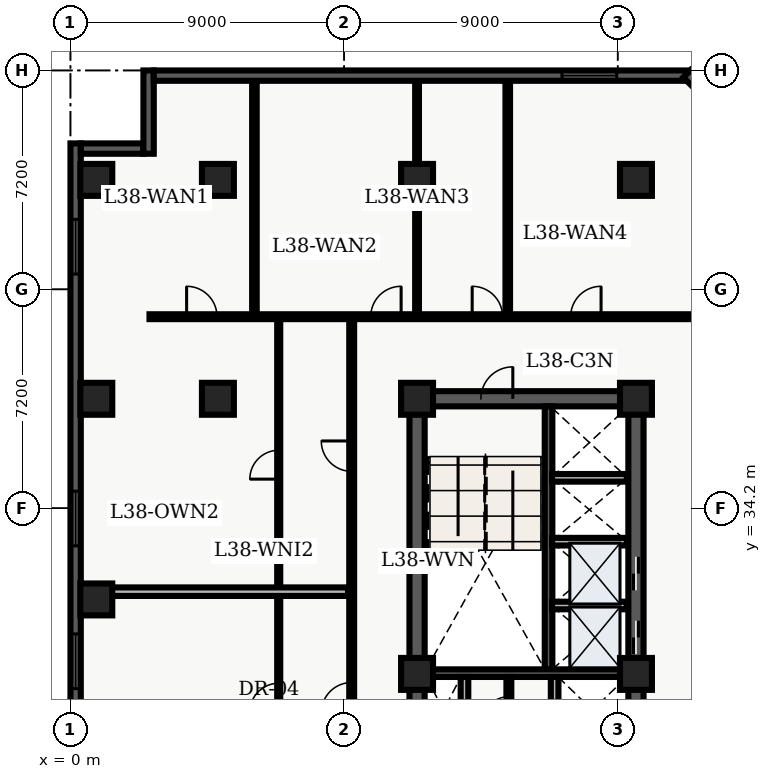
"""IFC4 building model, lengths in metres.
Left out: names, types, materials, properties, quantities, classifications, styles, units other than length and angle.
Written with IfcOpenShell. Run it as: python <this file> out.ifc"""

import sys

from ifc_helpers import new_model, entity, si_unit, converted_unit, direction, frame, origin_with_axes, origin_2d_with_axis, place, context, subcontext, project, spatial, polyline, rectangle, outline, extrude, element, fill, save


model = new_model("IFC4")
c1 = context("Model", 3, precision=1e-05, world=origin_with_axes(), true_north=direction((0.0, 1.0)))
c2 = subcontext(c1, "Body", "Model", "MODEL_VIEW")
j1 = project(units=[si_unit("LENGTHUNIT", "METRE"), converted_unit("PLANEANGLEUNIT", "DEGREE", entity("IfcPlaneAngleMeasure", 0.017), si_unit("PLANEANGLEUNIT", "RADIAN"), dimensions=[0, 0, 0, 0, 0, 0, 0])], contexts=[c1])
p1 = place(None, origin_with_axes())
s1 = spatial("IfcSite", under=j1, at=p1, CompositionType="ELEMENT")
p2 = place(p1, origin_with_axes())
s2 = spatial("IfcBuilding", under=s1, at=p2, CompositionType="ELEMENT")
p3 = place(p2, frame((0.0, 0.0, 156.3), z_axis=(0.0, 0.0, 1.0), x_axis=(1.0, 0.0, 0.0)))
s3 = spatial("IfcBuildingStorey", under=s2, at=p3, CompositionType="ELEMENT", Elevation=156.3)
p4 = place(p3, frame((11.4, 10.8, 0.0), z_axis=(0.0, 0.0, 1.0), x_axis=(0.0, 1.0, 0.0)))
e1 = element("IfcWall", 1, at=p4, inside=s3, PredefinedType="SHEAR", context=c2, shape_type="SweptSolid", body=[
    extrude(outline(polyline([(0.0, -0.25), (27.0, -0.25), (27.0, 0.25), (0.0, 0.25), (0.0, -0.25)])), origin_with_axes(), (0.0, 0.0, 1.0), 3.66),
])
p5 = place(p3, frame((11.4, 37.8, 0.0), z_axis=(0.0, 0.0, 1.0), x_axis=(1.0, 0.0, 0.0)))
e2 = element("IfcWall", 2, at=p5, inside=s3, PredefinedType="SHEAR", context=c2, shape_type="SweptSolid", body=[
    extrude(outline(polyline([(0.0, -0.25), (7.2, -0.25), (7.2, 0.25), (0.0, 0.25), (0.0, -0.25)])), origin_with_axes(), (0.0, 0.0, 1.0), 3.66),
])
p6 = place(p5, frame((2.625, 0.0, 0.0), z_axis=(0.0, 0.0, 1.0), x_axis=(1.0, 0.0, 0.0)))
e3 = element("IfcOpeningElement", 3, at=p6, cuts=e2, PredefinedType="OPENING", context=c2, shape_type="SweptSolid", body=[
    extrude(rectangle(XDim=1.05, YDim=0.52, at=origin_2d_with_axis()), origin_with_axes(), (0.0, 0.0, 1.0), 2.15),
])
p7 = place(p3, frame((18.6, 24.3, 0.0), z_axis=(0.0, 0.0, 1.0), x_axis=(0.0, 1.0, 0.0)))
e4 = element("IfcWall", 4, at=p7, inside=s3, PredefinedType="SHEAR", context=c2, shape_type="SweptSolid", body=[
    extrude(outline(polyline([(0.0, -0.25), (13.5, -0.25), (13.5, 0.25), (0.0, 0.25), (0.0, -0.25)])), origin_with_axes(), (0.0, 0.0, 1.0), 3.66),
])
p8 = place(p7, frame((5.65, 0.0, 0.0), z_axis=(0.0, 0.0, 1.0), x_axis=(1.0, 0.0, 0.0)))
e5 = element("IfcOpeningElement", 5, at=p8, cuts=e4, PredefinedType="OPENING", context=c2, shape_type="SweptSolid", body=[
    extrude(rectangle(XDim=1.1, YDim=0.52, at=origin_2d_with_axis()), origin_with_axes(), (0.0, 0.0, 1.0), 2.15),
])
p9 = place(p7, frame((7.75, 0.0, 0.0), z_axis=(0.0, 0.0, 1.0), x_axis=(1.0, 0.0, 0.0)))
e6 = element("IfcOpeningElement", 6, at=p9, cuts=e4, PredefinedType="OPENING", context=c2, shape_type="SweptSolid", body=[
    extrude(rectangle(XDim=1.1, YDim=0.52, at=origin_2d_with_axis()), origin_with_axes(), (0.0, 0.0, 1.0), 2.15),
])
p10 = place(p3, frame((15.725, 28.9, 0.0), z_axis=(0.0, 0.0, 1.0), x_axis=(0.0, 1.0, 0.0)))
e7 = element("IfcWall", 7, at=p10, inside=s3, PredefinedType="SHEAR", context=c2, shape_type="SweptSolid", body=[
    extrude(outline(polyline([(0.0, -0.125), (8.65, -0.125), (8.65, 0.125), (0.0, 0.125), (0.0, -0.125)])), origin_with_axes(), (0.0, 0.0, 1.0), 3.66),
])
p11 = place(p3, frame((11.65, 28.775, 0.0), z_axis=(0.0, 0.0, 1.0), x_axis=(1.0, 0.0, 0.0)))
e8 = element("IfcWall", 8, at=p11, inside=s3, PredefinedType="SHEAR", context=c2, shape_type="SweptSolid", body=[
    extrude(outline(polyline([(0.0, -0.125), (6.7, -0.125), (6.7, 0.125), (0.0, 0.125), (0.0, -0.125)])), origin_with_axes(), (0.0, 0.0, 1.0), 3.66),
])
for number, where, z_axis, x_axis in (
    (9, (12.96, 26.45, 0.0), (0.0, 0.0, 1.0), (0.0, 1.0, 0.0)),
    (10, (15.925, 26.45, 0.0), (0.0, 0.0, 1.0), (0.0, 1.0, 0.0)),
):
    element("IfcWall", number, at=place(p3, frame(where, z_axis=z_axis, x_axis=x_axis)), inside=s3, PredefinedType="SOLIDWALL", context=c2, shape_type="SweptSolid", body=[
        extrude(outline(polyline([(0.0, -0.125), (2.2, -0.125), (2.2, 0.125), (0.0, 0.125), (0.0, -0.125)])), origin_with_axes(), (0.0, 0.0, 1.0), 2.7),
    ])
for number, where, z_axis, x_axis in (
    (11, (11.4, 28.75, 0.0), (0.0, 0.0, 1.0), (1.0, 0.0, 0.0)),
    (12, (11.4, 37.8, 0.0), (0.0, 0.0, 1.0), (1.0, 0.0, 0.0)),
    (13, (11.4, 45.0, 0.0), (0.0, 0.0, 1.0), (1.0, 0.0, 0.0)),
    (14, (18.6, 28.75, 0.0), (0.0, 0.0, 1.0), (1.0, 0.0, 0.0)),
    (15, (18.6, 37.8, 0.0), (0.0, 0.0, 1.0), (1.0, 0.0, 0.0)),
    (16, (18.6, 45.0, 0.0), (0.0, 0.0, 1.0), (1.0, 0.0, 0.0)),
    (17, (4.85, 37.8, 0.0), (0.0, 0.0, 1.0), (1.0, 0.0, 0.0)),
    (18, (4.85, 45.0, 0.0), (0.0, 0.0, 1.0), (1.0, 0.0, 0.0)),
    (19, (0.85, 31.2, 0.0), (0.0, 0.0, 1.0), (1.0, 0.0, 0.0)),
    (20, (0.85, 37.8, 0.0), (0.0, 0.0, 1.0), (1.0, 0.0, 0.0)),
    (21, (0.85, 45.0, 0.0), (0.0, 0.0, 1.0), (1.0, 0.0, 0.0)),
):
    element("IfcColumn", number, at=place(p3, frame(where, z_axis=z_axis, x_axis=x_axis)), inside=s3, PredefinedType="COLUMN", context=c2, shape_type="SweptSolid", body=[
        extrude(rectangle(XDim=1.05, YDim=1.05, at=origin_2d_with_axis()), origin_with_axes(), (0.0, 0.0, 1.0), 3.9),
    ])
p12 = place(p3, frame((14.42, 26.45, 0.0), z_axis=(0.0, 0.0, 1.0), x_axis=(0.0, 1.0, 0.0)))
e22 = element("IfcWall", 22, at=p12, inside=s3, PredefinedType="PARTITIONING", context=c2, shape_type="SweptSolid", body=[
    extrude(outline(polyline([(0.0, -0.08), (2.2, -0.08), (2.2, 0.08), (0.0, 0.08), (0.0, -0.08)])), origin_with_axes(), (0.0, 0.0, 1.0), 2.7),
])
p13 = place(p12, frame((1.1, 0.0, 0.0), z_axis=(0.0, 0.0, 1.0), x_axis=(1.0, 0.0, 0.0)))
e23 = element("IfcOpeningElement", 23, at=p13, cuts=e22, PredefinedType="OPENING", context=c2, shape_type="SweptSolid", body=[
    extrude(rectangle(XDim=0.9, YDim=0.18, at=origin_2d_with_axis()), origin_with_axes(), (0.0, 0.0, 1.0), 2.15),
])
for number, where, z_axis, x_axis in (
    (24, (15.84, 31.0, 0.0), (0.0, 0.0, 1.0), (1.0, 0.0, 0.0)),
    (25, (15.84, 33.1, 0.0), (0.0, 0.0, 1.0), (1.0, 0.0, 0.0)),
    (26, (15.84, 35.2, 0.0), (0.0, 0.0, 1.0), (1.0, 0.0, 0.0)),
):
    element("IfcWall", number, at=place(p3, frame(where, z_axis=z_axis, x_axis=x_axis)), inside=s3, PredefinedType="SOLIDWALL", context=c2, shape_type="SweptSolid", body=[
        extrude(outline(polyline([(0.0, -0.125), (2.46, -0.125), (2.46, 0.125), (0.0, 0.125), (0.0, -0.125)])), origin_with_axes(), (0.0, 0.0, 1.0), 2.7),
    ])
p14 = place(p3, frame((2.6, 40.5, 0.0), z_axis=(0.0, 0.0, 1.0), x_axis=(1.0, 0.0, 0.0)))
e27 = element("IfcWall", 27, at=p14, inside=s3, PredefinedType="PARTITIONING", context=c2, shape_type="SweptSolid", body=[
    extrude(outline(polyline([(0.0, -0.08), (20.117, -0.08), (20.117, 0.08), (0.0, 0.08), (0.0, -0.08)])), origin_with_axes(), (0.0, 0.0, 1.0), 2.7),
])
p15 = place(p14, frame((1.72, 0.0, 0.0), z_axis=(0.0, 0.0, 1.0), x_axis=(1.0, 0.0, 0.0)))
e28 = element("IfcOpeningElement", 28, at=p15, cuts=e27, PredefinedType="OPENING", context=c2, shape_type="SweptSolid", body=[
    extrude(rectangle(XDim=1.0, YDim=0.18, at=origin_2d_with_axis()), origin_with_axes(), (0.0, 0.0, 1.0), 2.15),
])
p16 = place(p14, frame((7.776, 0.0, 0.0), z_axis=(0.0, 0.0, 1.0), x_axis=(1.0, 0.0, 0.0)))
e29 = element("IfcOpeningElement", 29, at=p16, cuts=e27, PredefinedType="OPENING", context=c2, shape_type="SweptSolid", body=[
    extrude(rectangle(XDim=1.0, YDim=0.18, at=origin_2d_with_axis()), origin_with_axes(), (0.0, 0.0, 1.0), 2.15),
])
p17 = place(p14, frame((11.113, 0.0, 0.0), z_axis=(0.0, 0.0, 1.0), x_axis=(1.0, 0.0, 0.0)))
e30 = element("IfcOpeningElement", 30, at=p17, cuts=e27, PredefinedType="OPENING", context=c2, shape_type="SweptSolid", body=[
    extrude(rectangle(XDim=1.0, YDim=0.18, at=origin_2d_with_axis()), origin_with_axes(), (0.0, 0.0, 1.0), 2.15),
])
p18 = place(p14, frame((14.352, 0.0, 0.0), z_axis=(0.0, 0.0, 1.0), x_axis=(1.0, 0.0, 0.0)))
e31 = element("IfcOpeningElement", 31, at=p18, cuts=e27, PredefinedType="OPENING", context=c2, shape_type="SweptSolid", body=[
    extrude(rectangle(XDim=1.0, YDim=0.18, at=origin_2d_with_axis()), origin_with_axes(), (0.0, 0.0, 1.0), 2.15),
])
p19 = place(p3, frame((9.25, 24.4, 0.0), z_axis=(0.0, 0.0, 1.0), x_axis=(0.0, 1.0, 0.0)))
e32 = element("IfcWall", 32, at=p19, inside=s3, PredefinedType="PARTITIONING", context=c2, shape_type="SweptSolid", body=[
    extrude(outline(polyline([(0.0, -0.08), (16.1, -0.08), (16.1, 0.08), (0.0, 0.08), (0.0, -0.08)])), origin_with_axes(), (0.0, 0.0, 1.0), 2.7),
])
p20 = place(p19, frame((3.567, 0.0, 0.0), z_axis=(0.0, 0.0, 1.0), x_axis=(1.0, 0.0, 0.0)))
e33 = element("IfcOpeningElement", 33, at=p20, cuts=e32, PredefinedType="OPENING", context=c2, shape_type="SweptSolid", body=[
    extrude(rectangle(XDim=1.0, YDim=0.18, at=origin_2d_with_axis()), origin_with_axes(), (0.0, 0.0, 1.0), 2.15),
])
p21 = place(p19, frame((11.512, 0.0, 0.0), z_axis=(0.0, 0.0, 1.0), x_axis=(1.0, 0.0, 0.0)))
e34 = element("IfcOpeningElement", 34, at=p21, cuts=e32, PredefinedType="OPENING", context=c2, shape_type="SweptSolid", body=[
    extrude(rectangle(XDim=1.0, YDim=0.18, at=origin_2d_with_axis()), origin_with_axes(), (0.0, 0.0, 1.0), 2.15),
])
p22 = place(p3, frame((6.85, 24.55, 0.0), z_axis=(0.0, 0.0, 1.0), x_axis=(0.0, 1.0, 0.0)))
e35 = element("IfcWall", 35, at=p22, inside=s3, PredefinedType="PARTITIONING", context=c2, shape_type="SweptSolid", body=[
    extrude(outline(polyline([(0.0, -0.05), (15.75, -0.05), (15.75, 0.05), (0.0, 0.05), (0.0, -0.05)])), origin_with_axes(), (0.0, 0.0, 1.0), 2.7),
])
p23 = place(p22, frame((3.417, 0.0, 0.0), z_axis=(0.0, 0.0, 1.0), x_axis=(1.0, 0.0, 0.0)))
e36 = element("IfcOpeningElement", 36, at=p23, cuts=e35, PredefinedType="OPENING", context=c2, shape_type="SweptSolid", body=[
    extrude(rectangle(XDim=0.95, YDim=0.12, at=origin_2d_with_axis()), origin_with_axes(), (0.0, 0.0, 1.0), 2.15),
])
p24 = place(p22, frame((11.082, 0.0, 0.0), z_axis=(0.0, 0.0, 1.0), x_axis=(1.0, 0.0, 0.0)))
e37 = element("IfcOpeningElement", 37, at=p24, cuts=e35, PredefinedType="OPENING", context=c2, shape_type="SweptSolid", body=[
    extrude(rectangle(XDim=0.95, YDim=0.12, at=origin_2d_with_axis()), origin_with_axes(), (0.0, 0.0, 1.0), 2.15),
])
p25 = place(p3, frame((0.335, 31.455, 0.0), z_axis=(0.0, 0.0, 1.0), x_axis=(1.0, 0.0, 0.0)))
e38 = element("IfcWall", 38, at=p25, inside=s3, PredefinedType="PARTITIONING", context=c2, shape_type="SweptSolid", body=[
    extrude(outline(polyline([(0.0, -0.14), (8.795, -0.14), (8.795, 0.14), (0.0, 0.14), (0.0, -0.14)])), origin_with_axes(), (0.0, 0.0, 1.0), 2.7),
])
p26 = place(p3, frame((6.051, 40.6, 0.0), z_axis=(0.0, 0.0, 1.0), x_axis=(0.0, 1.0, 0.0)))
e39 = element("IfcWall", 39, at=p26, inside=s3, PredefinedType="PARTITIONING", context=c2, shape_type="SweptSolid", body=[
    extrude(outline(polyline([(0.0, -0.075), (7.665, -0.075), (7.665, 0.075), (0.0, 0.075), (0.0, -0.075)])), origin_with_axes(), (0.0, 0.0, 1.0), 2.7),
])
p27 = place(p3, frame((11.4, 40.6, 0.0), z_axis=(0.0, 0.0, 1.0), x_axis=(0.0, 1.0, 0.0)))
e40 = element("IfcWall", 40, at=p27, inside=s3, PredefinedType="PARTITIONING", context=c2, shape_type="SweptSolid", body=[
    extrude(outline(polyline([(0.0, -0.062), (7.665, -0.062), (7.665, 0.062), (0.0, 0.062), (0.0, -0.062)])), origin_with_axes(), (0.0, 0.0, 1.0), 2.7),
])
p28 = place(p3, frame((14.383, 40.6, 0.0), z_axis=(0.0, 0.0, 1.0), x_axis=(0.0, 1.0, 0.0)))
e41 = element("IfcWall", 41, at=p28, inside=s3, PredefinedType="PARTITIONING", context=c2, shape_type="SweptSolid", body=[
    extrude(outline(polyline([(0.0, -0.075), (7.665, -0.075), (7.665, 0.075), (0.0, 0.075), (0.0, -0.075)])), origin_with_axes(), (0.0, 0.0, 1.0), 2.7),
])
p29 = place(p3, frame((0.17, 2.74, 0.0), z_axis=(0.0, 0.0, 1.0), x_axis=(0.0, 1.0, 0.0)))
e42 = element("IfcWall", 42, at=p29, inside=s3, PredefinedType="SOLIDWALL", context=c2, shape_type="SweptSolid", body=[
    extrude(outline(polyline([(0.0, -0.17), (43.46, -0.17), (43.46, 0.17), (0.0, 0.17), (0.0, -0.17)])), origin_with_axes(), (0.0, 0.0, 1.0), 3.66),
])
p30 = place(p29, frame((2.948, 0.0, 0.45), z_axis=(0.0, 0.0, 1.0), x_axis=(1.0, 0.0, 0.0)))
e43 = element("IfcOpeningElement", 43, at=p30, cuts=e42, PredefinedType="OPENING", context=c2, shape_type="SweptSolid", body=[
    extrude(rectangle(XDim=1.8, YDim=0.36, at=origin_2d_with_axis()), origin_with_axes(), (0.0, 0.0, 1.0), 2.1),
])
p31 = place(p29, frame((12.339, 0.0, 0.45), z_axis=(0.0, 0.0, 1.0), x_axis=(1.0, 0.0, 0.0)))
e44 = element("IfcOpeningElement", 44, at=p31, cuts=e42, PredefinedType="OPENING", context=c2, shape_type="SweptSolid", body=[
    extrude(rectangle(XDim=1.8, YDim=0.36, at=origin_2d_with_axis()), origin_with_axes(), (0.0, 0.0, 1.0), 2.1),
])
p32 = place(p29, frame((26.426, 0.0, 0.45), z_axis=(0.0, 0.0, 1.0), x_axis=(1.0, 0.0, 0.0)))
e45 = element("IfcOpeningElement", 45, at=p32, cuts=e42, PredefinedType="OPENING", context=c2, shape_type="SweptSolid", body=[
    extrude(rectangle(XDim=1.8, YDim=0.36, at=origin_2d_with_axis()), origin_with_axes(), (0.0, 0.0, 1.0), 2.1),
])
p33 = place(p29, frame((31.121, 0.0, 0.45), z_axis=(0.0, 0.0, 1.0), x_axis=(1.0, 0.0, 0.0)))
e46 = element("IfcOpeningElement", 46, at=p33, cuts=e42, PredefinedType="OPENING", context=c2, shape_type="SweptSolid", body=[
    extrude(rectangle(XDim=1.8, YDim=0.36, at=origin_2d_with_axis()), origin_with_axes(), (0.0, 0.0, 1.0), 2.1),
])
p34 = place(p29, frame((40.062, 0.0, 0.45), z_axis=(0.0, 0.0, 1.0), x_axis=(1.0, 0.0, 0.0)))
e47 = element("IfcOpeningElement", 47, at=p34, cuts=e42, PredefinedType="OPENING", context=c2, shape_type="SweptSolid", body=[
    extrude(rectangle(XDim=1.8, YDim=0.36, at=origin_2d_with_axis()), origin_with_axes(), (0.0, 0.0, 1.0), 2.1),
])
p35 = place(p3, frame((0.34, 46.03, 0.0), z_axis=(0.0, 0.0, 1.0), x_axis=(1.0, 0.0, 0.0)))
e48 = element("IfcWall", 48, at=p35, inside=s3, PredefinedType="SOLIDWALL", context=c2, shape_type="SweptSolid", body=[
    extrude(outline(polyline([(0.0, -0.17), (2.06, -0.17), (2.06, 0.17), (0.0, 0.17), (0.0, -0.17)])), origin_with_axes(), (0.0, 0.0, 1.0), 3.66),
])
p36 = place(p3, frame((2.57, 45.86, 0.0), z_axis=(0.0, 0.0, 1.0), x_axis=(0.0, 1.0, 0.0)))
e49 = element("IfcWall", 49, at=p36, inside=s3, PredefinedType="SOLIDWALL", context=c2, shape_type="SweptSolid", body=[
    extrude(outline(polyline([(0.0, -0.17), (2.74, -0.17), (2.74, 0.17), (0.0, 0.17), (0.0, -0.17)])), origin_with_axes(), (0.0, 0.0, 1.0), 3.66),
])
p37 = place(p3, frame((2.74, 48.43, 0.0), z_axis=(0.0, 0.0, 1.0), x_axis=(1.0, 0.0, 0.0)))
e50 = element("IfcWall", 50, at=p37, inside=s3, PredefinedType="SOLIDWALL", context=c2, shape_type="SweptSolid", body=[
    extrude(outline(polyline([(0.0, -0.17), (17.672, -0.17), (17.672, 0.17), (0.0, 0.17), (0.0, -0.17)])), origin_with_axes(), (0.0, 0.0, 1.0), 3.66),
])
p38 = place(p37, frame((14.327, 0.0, 0.45), z_axis=(0.0, 0.0, 1.0), x_axis=(1.0, 0.0, 0.0)))
e51 = element("IfcOpeningElement", 51, at=p38, cuts=e50, PredefinedType="OPENING", context=c2, shape_type="SweptSolid", body=[
    extrude(rectangle(XDim=1.8, YDim=0.36, at=origin_2d_with_axis()), origin_with_axes(), (0.0, 0.0, 1.0), 2.1),
])
p39 = place(p3, frame((20.278, 48.494, 0.0), z_axis=(0.0, 0.0, 1.0), x_axis=(0.707107, -0.707107, 0.0)))
e52 = element("IfcWall", 52, at=p39, inside=s3, PredefinedType="SOLIDWALL", context=c2, shape_type="SweptSolid", body=[
    extrude(outline(polyline([(0.0, -0.17), (3.753, -0.17), (3.753, 0.17), (0.0, 0.17), (0.0, -0.17)])), origin_with_axes(), (0.0, 0.0, 1.0), 3.66),
])
p40 = place(p7, frame((5.65, 0.0, 0.0), z_axis=(0.0, 0.0, 1.0), x_axis=(1.0, 0.0, 0.0)))
e53 = element("IfcDoor", 53, at=p40, inside=s3, OperationType="SLIDING_TO_LEFT", PredefinedType="DOOR", context=c2, shape_type="SweptSolid", body=[
    extrude(rectangle(XDim=1.1, YDim=0.09, at=origin_2d_with_axis()), origin_with_axes(), (0.0, 0.0, 1.0), 2.15),
])
fill(e5, e53)
p41 = place(p7, frame((7.75, 0.0, 0.0), z_axis=(0.0, 0.0, 1.0), x_axis=(1.0, 0.0, 0.0)))
e54 = element("IfcDoor", 54, at=p41, inside=s3, OperationType="SLIDING_TO_RIGHT", PredefinedType="DOOR", context=c2, shape_type="SweptSolid", body=[
    extrude(rectangle(XDim=1.1, YDim=0.09, at=origin_2d_with_axis()), origin_with_axes(), (0.0, 0.0, 1.0), 2.15),
])
fill(e6, e54)
p42 = place(p5, frame((2.625, 0.0, 0.0), z_axis=(0.0, 0.0, 1.0), x_axis=(1.0, 0.0, 0.0)))
e55 = element("IfcDoor", 55, at=p42, inside=s3, OperationType="SINGLE_SWING_RIGHT", PredefinedType="DOOR", context=c2, shape_type="SweptSolid", body=[
    extrude(rectangle(XDim=1.05, YDim=0.09, at=origin_2d_with_axis()), origin_with_axes(), (0.0, 0.0, 1.0), 2.15),
])
fill(e3, e55)
p43 = place(p12, frame((1.1, 0.0, 0.0), z_axis=(0.0, 0.0, 1.0), x_axis=(1.0, 0.0, 0.0)))
e56 = element("IfcDoor", 56, at=p43, inside=s3, OperationType="SINGLE_SWING_LEFT", PredefinedType="DOOR", context=c2, shape_type="SweptSolid", body=[
    extrude(rectangle(XDim=0.9, YDim=0.09, at=origin_2d_with_axis()), origin_with_axes(), (0.0, 0.0, 1.0), 2.15),
])
fill(e23, e56)
p44 = place(p22, frame((3.417, 0.0, 0.0), z_axis=(0.0, 0.0, 1.0), x_axis=(1.0, 0.0, 0.0)))
e57 = element("IfcDoor", 57, at=p44, inside=s3, OperationType="SINGLE_SWING_LEFT", PredefinedType="DOOR", context=c2, shape_type="SweptSolid", body=[
    extrude(rectangle(XDim=0.95, YDim=0.06, at=origin_2d_with_axis()), origin_with_axes(), (0.0, 0.0, 1.0), 2.15),
])
fill(e36, e57)
p45 = place(p19, frame((3.567, 0.0, 0.0), z_axis=(0.0, 0.0, 1.0), x_axis=(1.0, 0.0, 0.0)))
e58 = element("IfcDoor", 58, at=p45, inside=s3, OperationType="SINGLE_SWING_LEFT", PredefinedType="DOOR", context=c2, shape_type="SweptSolid", body=[
    extrude(rectangle(XDim=1.0, YDim=0.09, at=origin_2d_with_axis()), origin_with_axes(), (0.0, 0.0, 1.0), 2.15),
])
fill(e33, e58)
p46 = place(p22, frame((11.082, 0.0, 0.0), z_axis=(0.0, 0.0, 1.0), x_axis=(1.0, 0.0, 0.0)))
e59 = element("IfcDoor", 59, at=p46, inside=s3, OperationType="SINGLE_SWING_LEFT", PredefinedType="DOOR", context=c2, shape_type="SweptSolid", body=[
    extrude(rectangle(XDim=0.95, YDim=0.06, at=origin_2d_with_axis()), origin_with_axes(), (0.0, 0.0, 1.0), 2.15),
])
fill(e37, e59)
p47 = place(p19, frame((11.512, 0.0, 0.0), z_axis=(0.0, 0.0, 1.0), x_axis=(1.0, 0.0, 0.0)))
e60 = element("IfcDoor", 60, at=p47, inside=s3, OperationType="SINGLE_SWING_RIGHT", PredefinedType="DOOR", context=c2, shape_type="SweptSolid", body=[
    extrude(rectangle(XDim=1.0, YDim=0.09, at=origin_2d_with_axis()), origin_with_axes(), (0.0, 0.0, 1.0), 2.15),
])
fill(e34, e60)
p48 = place(p14, frame((1.72, 0.0, 0.0), z_axis=(0.0, 0.0, 1.0), x_axis=(1.0, 0.0, 0.0)))
e61 = element("IfcDoor", 61, at=p48, inside=s3, OperationType="SINGLE_SWING_LEFT", PredefinedType="DOOR", context=c2, shape_type="SweptSolid", body=[
    extrude(rectangle(XDim=1.0, YDim=0.09, at=origin_2d_with_axis()), origin_with_axes(), (0.0, 0.0, 1.0), 2.15),
])
fill(e28, e61)
p49 = place(p14, frame((7.776, 0.0, 0.0), z_axis=(0.0, 0.0, 1.0), x_axis=(1.0, 0.0, 0.0)))
e62 = element("IfcDoor", 62, at=p49, inside=s3, OperationType="SINGLE_SWING_RIGHT", PredefinedType="DOOR", context=c2, shape_type="SweptSolid", body=[
    extrude(rectangle(XDim=1.0, YDim=0.09, at=origin_2d_with_axis()), origin_with_axes(), (0.0, 0.0, 1.0), 2.15),
])
fill(e29, e62)
p50 = place(p14, frame((11.113, 0.0, 0.0), z_axis=(0.0, 0.0, 1.0), x_axis=(1.0, 0.0, 0.0)))
e63 = element("IfcDoor", 63, at=p50, inside=s3, OperationType="SINGLE_SWING_LEFT", PredefinedType="DOOR", context=c2, shape_type="SweptSolid", body=[
    extrude(rectangle(XDim=1.0, YDim=0.09, at=origin_2d_with_axis()), origin_with_axes(), (0.0, 0.0, 1.0), 2.15),
])
fill(e30, e63)
p51 = place(p14, frame((14.352, 0.0, 0.0), z_axis=(0.0, 0.0, 1.0), x_axis=(1.0, 0.0, 0.0)))
e64 = element("IfcDoor", 64, at=p51, inside=s3, OperationType="SINGLE_SWING_RIGHT", PredefinedType="DOOR", context=c2, shape_type="SweptSolid", body=[
    extrude(rectangle(XDim=1.0, YDim=0.09, at=origin_2d_with_axis()), origin_with_axes(), (0.0, 0.0, 1.0), 2.15),
])
fill(e31, e64)
p52 = place(p29, frame((26.426, 0.0, 0.45), z_axis=(0.0, 0.0, 1.0), x_axis=(1.0, 0.0, 0.0)))
e65 = element("IfcWindow", 65, at=p52, inside=s3, PredefinedType="WINDOW", context=c2, shape_type="SweptSolid", body=[
    extrude(rectangle(XDim=1.8, YDim=0.09, at=origin_2d_with_axis()), origin_with_axes(), (0.0, 0.0, 1.0), 2.1),
])
fill(e45, e65)
p53 = place(p29, frame((31.121, 0.0, 0.45), z_axis=(0.0, 0.0, 1.0), x_axis=(1.0, 0.0, 0.0)))
e66 = element("IfcWindow", 66, at=p53, inside=s3, PredefinedType="WINDOW", context=c2, shape_type="SweptSolid", body=[
    extrude(rectangle(XDim=1.8, YDim=0.09, at=origin_2d_with_axis()), origin_with_axes(), (0.0, 0.0, 1.0), 2.1),
])
fill(e46, e66)
p54 = place(p29, frame((40.062, 0.0, 0.45), z_axis=(0.0, 0.0, 1.0), x_axis=(1.0, 0.0, 0.0)))
e67 = element("IfcWindow", 67, at=p54, inside=s3, PredefinedType="WINDOW", context=c2, shape_type="SweptSolid", body=[
    extrude(rectangle(XDim=1.8, YDim=0.09, at=origin_2d_with_axis()), origin_with_axes(), (0.0, 0.0, 1.0), 2.1),
])
fill(e47, e67)
p55 = place(p37, frame((14.327, 0.0, 0.45), z_axis=(0.0, 0.0, 1.0), x_axis=(1.0, 0.0, 0.0)))
e68 = element("IfcWindow", 68, at=p55, inside=s3, PredefinedType="WINDOW", context=c2, shape_type="SweptSolid", body=[
    extrude(rectangle(XDim=1.8, YDim=0.09, at=origin_2d_with_axis()), origin_with_axes(), (0.0, 0.0, 1.0), 2.1),
])
fill(e51, e68)
save(model, sys.argv[1])
